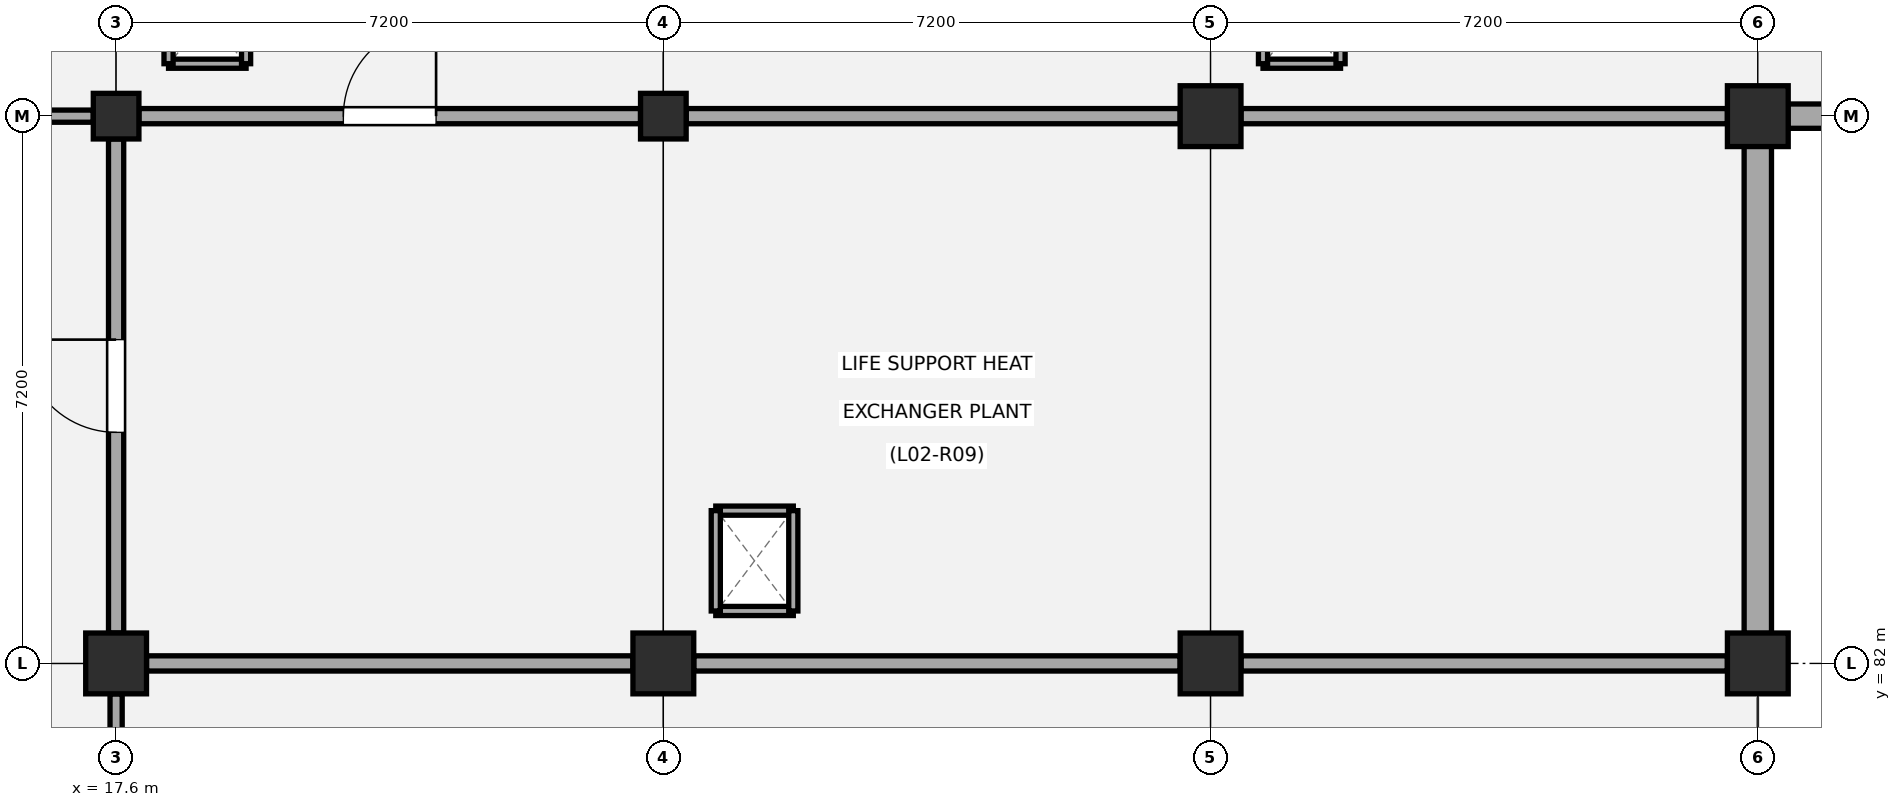
"""IFC4 building model, lengths in metres.
Left out: names, types, materials, properties, quantities, classifications, styles, units other than length and angle.
Written with IfcOpenShell. Run it as: python <this file> out.ifc"""

import sys

from ifc_helpers import new_model, si_unit, direction, frame, frame_2d, origin, origin_2d, place, context, subcontext, project, spatial, rectangle, extrude, element, fill, save


model = new_model("IFC4")
c1 = context("Model", 3, precision=1e-05, world=origin(), true_north=direction((0.0, 1.0)))
c2 = subcontext(c1, "Body", "Model", "MODEL_VIEW")
j1 = project(units=[si_unit("LENGTHUNIT", "METRE"), si_unit("PLANEANGLEUNIT", "RADIAN")], contexts=[c1])
p1 = place(None, origin())
s1 = spatial("IfcSite", under=j1, at=p1, CompositionType="ELEMENT")
p2 = place(p1, origin())
s2 = spatial("IfcBuilding", under=s1, at=p2, CompositionType="ELEMENT")
p3 = place(p2, frame((0.0, 0.0, 9.18)))
s3 = spatial("IfcBuildingStorey", under=s2, at=p3, CompositionType="ELEMENT", Elevation=9.18)
p4 = place(p3, frame((17.6, 82.0, 0.0), z_axis=(0.0, 0.0, 1.0), x_axis=(1.0, 0.0, 0.0)))
e1 = element("IfcColumn", 1, at=p4, inside=s3, PredefinedType="COLUMN", context=c2, shape_type="SweptSolid", body=[
    extrude(rectangle(XDim=0.8, YDim=0.8, at=origin_2d()), origin(), (0.0, 0.0, 1.0), 4.32),
])
p5 = place(p3, frame((17.6, 89.2, 0.0), z_axis=(0.0, 0.0, 1.0), x_axis=(1.0, 0.0, 0.0)))
e2 = element("IfcColumn", 2, at=p5, inside=s3, PredefinedType="COLUMN", context=c2, shape_type="SweptSolid", body=[
    extrude(rectangle(XDim=0.6, YDim=0.6, at=origin_2d()), origin(), (0.0, 0.0, 1.0), 4.32),
])
p6 = place(p3, frame((24.8, 82.0, 0.0), z_axis=(0.0, 0.0, 1.0), x_axis=(1.0, 0.0, 0.0)))
e3 = element("IfcColumn", 3, at=p6, inside=s3, PredefinedType="COLUMN", context=c2, shape_type="SweptSolid", body=[
    extrude(rectangle(XDim=0.8, YDim=0.8, at=origin_2d()), origin(), (0.0, 0.0, 1.0), 4.32),
])
p7 = place(p3, frame((24.8, 89.2, 0.0), z_axis=(0.0, 0.0, 1.0), x_axis=(1.0, 0.0, 0.0)))
e4 = element("IfcColumn", 4, at=p7, inside=s3, PredefinedType="COLUMN", context=c2, shape_type="SweptSolid", body=[
    extrude(rectangle(XDim=0.6, YDim=0.6, at=origin_2d()), origin(), (0.0, 0.0, 1.0), 4.32),
])
for number, where, z_axis, x_axis in (
    (5, (32.0, 82.0, 0.0), (0.0, 0.0, 1.0), (1.0, 0.0, 0.0)),
    (6, (32.0, 89.2, 0.0), (0.0, 0.0, 1.0), (1.0, 0.0, 0.0)),
    (7, (39.2, 82.0, 0.0), (0.0, 0.0, 1.0), (1.0, 0.0, 0.0)),
    (8, (39.2, 89.2, 0.0), (0.0, 0.0, 1.0), (1.0, 0.0, 0.0)),
):
    element("IfcColumn", number, at=place(p3, frame(where, z_axis=z_axis, x_axis=x_axis)), inside=s3, PredefinedType="COLUMN", context=c2, shape_type="SweptSolid", body=[
        extrude(rectangle(XDim=0.8, YDim=0.8, at=origin_2d()), origin(), (0.0, 0.0, 1.0), 4.32),
    ])
p8 = place(p3, frame((46.105, 89.2, 0.0), z_axis=(0.0, 0.0, 1.0), x_axis=(-1.0, 0.0, 0.0)))
e9 = element("IfcWall", 9, at=p8, inside=s3, PredefinedType="STANDARD", context=c2, shape_type="SweptSolid", body=[
    extrude(rectangle(XDim=6.51, YDim=0.32, at=frame_2d((3.255, 0.0))), origin(), (0.0, 0.0, 1.0), 3.41),
])
p9 = place(p8, frame((2.255, 0.0, 0.95)))
e10 = element("IfcOpeningElement", 10, at=p9, cuts=e9, PredefinedType="OPENING", context=c2, shape_type="SweptSolid", body=[
    extrude(rectangle(XDim=2.0, YDim=1.9, at=frame_2d((1.0, 0.95))), frame((0.0, 0.17, 0.0), z_axis=(0.0, -1.0, 0.0), x_axis=(1.0, 0.0, 0.0)), (0.0, 0.0, 1.0), 0.34),
])
p10 = place(p3, frame((39.2, 88.805, 0.0), z_axis=(0.0, 0.0, 1.0), x_axis=(0.0, -1.0, 0.0)))
e11 = element("IfcWall", 11, at=p10, inside=s3, PredefinedType="STANDARD", context=c2, shape_type="SweptSolid", body=[
    extrude(rectangle(XDim=6.41, YDim=0.36, at=frame_2d((3.205, 0.0))), origin(), (0.0, 0.0, 1.0), 3.41),
])
p11 = place(p3, frame((18.29, 89.89, 0.0), z_axis=(0.0, 0.0, 1.0), x_axis=(1.0, 0.0, 0.0)))
e12 = element("IfcWall", 12, at=p11, inside=s3, PredefinedType="PARTITIONING", context=c2, shape_type="SweptSolid", body=[
    extrude(rectangle(XDim=1.02, YDim=0.12, at=frame_2d((0.51, 0.0))), origin(), (0.0, 0.0, 1.0), 4.02),
])
for number, where, z_axis, x_axis in (
    (13, (18.29, 89.89, 0.0), (0.0, 0.0, 1.0), (0.0, 1.0, 0.0)),
    (14, (19.31, 89.89, 0.0), (0.0, 0.0, 1.0), (0.0, 1.0, 0.0)),
):
    element("IfcWall", number, at=place(p3, frame(where, z_axis=z_axis, x_axis=x_axis)), inside=s3, PredefinedType="PARTITIONING", context=c2, shape_type="SweptSolid", body=[
        extrude(rectangle(XDim=1.32, YDim=0.12, at=frame_2d((0.66, 0.0))), origin(), (0.0, 0.0, 1.0), 4.02),
    ])
for number, where, z_axis, x_axis in (
    (15, (25.49, 82.69, 0.0), (0.0, 0.0, 1.0), (1.0, 0.0, 0.0)),
    (16, (25.49, 84.01, 0.0), (0.0, 0.0, 1.0), (1.0, 0.0, 0.0)),
):
    element("IfcWall", number, at=place(p3, frame(where, z_axis=z_axis, x_axis=x_axis)), inside=s3, PredefinedType="PARTITIONING", context=c2, shape_type="SweptSolid", body=[
        extrude(rectangle(XDim=1.02, YDim=0.12, at=frame_2d((0.51, 0.0))), origin(), (0.0, 0.0, 1.0), 4.02),
    ])
for number, where, z_axis, x_axis in (
    (17, (25.49, 82.69, 0.0), (0.0, 0.0, 1.0), (0.0, 1.0, 0.0)),
    (18, (26.51, 82.69, 0.0), (0.0, 0.0, 1.0), (0.0, 1.0, 0.0)),
):
    element("IfcWall", number, at=place(p3, frame(where, z_axis=z_axis, x_axis=x_axis)), inside=s3, PredefinedType="PARTITIONING", context=c2, shape_type="SweptSolid", body=[
        extrude(rectangle(XDim=1.32, YDim=0.12, at=frame_2d((0.66, 0.0))), origin(), (0.0, 0.0, 1.0), 4.02),
    ])
p12 = place(p3, frame((32.69, 89.89, 0.0), z_axis=(0.0, 0.0, 1.0), x_axis=(1.0, 0.0, 0.0)))
e19 = element("IfcWall", 19, at=p12, inside=s3, PredefinedType="PARTITIONING", context=c2, shape_type="SweptSolid", body=[
    extrude(rectangle(XDim=1.02, YDim=0.12, at=frame_2d((0.51, 0.0))), origin(), (0.0, 0.0, 1.0), 4.02),
])
for number, where, z_axis, x_axis in (
    (20, (32.69, 89.89, 0.0), (0.0, 0.0, 1.0), (0.0, 1.0, 0.0)),
    (21, (33.71, 89.89, 0.0), (0.0, 0.0, 1.0), (0.0, 1.0, 0.0)),
):
    element("IfcWall", number, at=place(p3, frame(where, z_axis=z_axis, x_axis=x_axis)), inside=s3, PredefinedType="PARTITIONING", context=c2, shape_type="SweptSolid", body=[
        extrude(rectangle(XDim=1.32, YDim=0.12, at=frame_2d((0.66, 0.0))), origin(), (0.0, 0.0, 1.0), 4.02),
    ])
p13 = place(p3, frame((17.6, 75.2, 0.0), z_axis=(0.0, 0.0, 1.0), x_axis=(0.0, 1.0, 0.0)))
e22 = element("IfcWall", 22, at=p13, inside=s3, PredefinedType="PARTITIONING", context=c2, shape_type="SweptSolid", body=[
    extrude(rectangle(XDim=6.4, YDim=0.16, at=frame_2d((3.2, 0.0))), origin(), (0.0, 0.0, 1.0), 3.36),
])
p14 = place(p3, frame((17.6, 82.4, 0.0), z_axis=(0.0, 0.0, 1.0), x_axis=(0.0, 1.0, 0.0)))
e23 = element("IfcWall", 23, at=p14, inside=s3, PredefinedType="PARTITIONING", context=c2, shape_type="SweptSolid", body=[
    extrude(rectangle(XDim=6.5, YDim=0.2, at=frame_2d((3.25, 0.0))), origin(), (0.0, 0.0, 1.0), 3.43),
])
p15 = place(p14, frame((2.64, 0.0, 0.0)))
e24 = element("IfcOpeningElement", 24, at=p15, cuts=e23, PredefinedType="OPENING", context=c2, shape_type="SweptSolid", body=[
    extrude(rectangle(XDim=1.22, YDim=2.16, at=frame_2d((0.61, 1.08))), frame((0.0, 0.11, 0.0), z_axis=(0.0, -1.0, 0.0), x_axis=(1.0, 0.0, 0.0)), (0.0, 0.0, 1.0), 0.22),
])
p16 = place(p3, frame((10.7, 89.2, 0.0), z_axis=(0.0, 0.0, 1.0), x_axis=(1.0, 0.0, 0.0)))
e25 = element("IfcWall", 25, at=p16, inside=s3, PredefinedType="PARTITIONING", context=c2, shape_type="SweptSolid", body=[
    extrude(rectangle(XDim=6.6, YDim=0.16, at=frame_2d((3.3, 0.0))), origin(), (0.0, 0.0, 1.0), 3.43),
])
p17 = place(p16, frame((2.37, 0.0, 0.0)))
e26 = element("IfcOpeningElement", 26, at=p17, cuts=e25, PredefinedType="OPENING", context=c2, shape_type="SweptSolid", body=[
    extrude(rectangle(XDim=1.86, YDim=2.26, at=frame_2d((0.93, 1.13))), frame((0.0, 0.09, 0.0), z_axis=(0.0, -1.0, 0.0), x_axis=(1.0, 0.0, 0.0)), (0.0, 0.0, 1.0), 0.18),
])
p18 = place(p3, frame((18.0, 82.0, 0.0), z_axis=(0.0, 0.0, 1.0), x_axis=(1.0, 0.0, 0.0)))
e27 = element("IfcWall", 27, at=p18, inside=s3, PredefinedType="PARTITIONING", context=c2, shape_type="SweptSolid", body=[
    extrude(rectangle(XDim=6.4, YDim=0.2, at=frame_2d((3.2, 0.0))), origin(), (0.0, 0.0, 1.0), 3.41),
])
p19 = place(p3, frame((17.9, 89.2, 0.0), z_axis=(0.0, 0.0, 1.0), x_axis=(1.0, 0.0, 0.0)))
e28 = element("IfcWall", 28, at=p19, inside=s3, PredefinedType="PARTITIONING", context=c2, shape_type="SweptSolid", body=[
    extrude(rectangle(XDim=6.6, YDim=0.2, at=frame_2d((3.3, 0.0))), origin(), (0.0, 0.0, 1.0), 3.38),
])
p20 = place(p19, frame((2.69, 0.0, 0.0)))
e29 = element("IfcOpeningElement", 29, at=p20, cuts=e28, PredefinedType="OPENING", context=c2, shape_type="SweptSolid", body=[
    extrude(rectangle(XDim=1.22, YDim=2.16, at=frame_2d((0.61, 1.08))), frame((0.0, 0.11, 0.0), z_axis=(0.0, -1.0, 0.0), x_axis=(1.0, 0.0, 0.0)), (0.0, 0.0, 1.0), 0.22),
])
p21 = place(p3, frame((25.2, 82.0, 0.0), z_axis=(0.0, 0.0, 1.0), x_axis=(1.0, 0.0, 0.0)))
e30 = element("IfcWall", 30, at=p21, inside=s3, PredefinedType="PARTITIONING", context=c2, shape_type="SweptSolid", body=[
    extrude(rectangle(XDim=6.4, YDim=0.2, at=frame_2d((3.2, 0.0))), origin(), (0.0, 0.0, 1.0), 3.38),
])
p22 = place(p3, frame((25.1, 89.2, 0.0), z_axis=(0.0, 0.0, 1.0), x_axis=(1.0, 0.0, 0.0)))
e31 = element("IfcWall", 31, at=p22, inside=s3, PredefinedType="PARTITIONING", context=c2, shape_type="SweptSolid", body=[
    extrude(rectangle(XDim=6.5, YDim=0.2, at=frame_2d((3.25, 0.0))), origin(), (0.0, 0.0, 1.0), 3.43),
])
p23 = place(p3, frame((32.4, 82.0, 0.0), z_axis=(0.0, 0.0, 1.0), x_axis=(1.0, 0.0, 0.0)))
e32 = element("IfcWall", 32, at=p23, inside=s3, PredefinedType="PARTITIONING", context=c2, shape_type="SweptSolid", body=[
    extrude(rectangle(XDim=6.4, YDim=0.2, at=frame_2d((3.2, 0.0))), origin(), (0.0, 0.0, 1.0), 3.41),
])
p24 = place(p3, frame((32.4, 89.2, 0.0), z_axis=(0.0, 0.0, 1.0), x_axis=(1.0, 0.0, 0.0)))
e33 = element("IfcWall", 33, at=p24, inside=s3, PredefinedType="PARTITIONING", context=c2, shape_type="SweptSolid", body=[
    extrude(rectangle(XDim=6.4, YDim=0.2, at=frame_2d((3.2, 0.0))), origin(), (0.0, 0.0, 1.0), 3.38),
])
p25 = place(p20, origin())
e34 = element("IfcDoor", 34, at=p25, inside=s3, OperationType="SINGLE_SWING_RIGHT", PredefinedType="DOOR", context=c2, shape_type="SweptSolid", body=[
    extrude(rectangle(XDim=1.22, YDim=2.16, at=frame_2d((0.61, 1.08))), frame((0.0, 0.025, 0.0), z_axis=(0.0, -1.0, 0.0), x_axis=(1.0, 0.0, 0.0)), (0.0, 0.0, 1.0), 0.05),
])
fill(e29, e34)
p26 = place(p15, origin())
e35 = element("IfcDoor", 35, at=p26, inside=s3, OperationType="SINGLE_SWING_RIGHT", PredefinedType="DOOR", context=c2, shape_type="SweptSolid", body=[
    extrude(rectangle(XDim=1.22, YDim=2.16, at=frame_2d((0.61, 1.08))), frame((0.0, 0.025, 0.0), z_axis=(0.0, -1.0, 0.0), x_axis=(1.0, 0.0, 0.0)), (0.0, 0.0, 1.0), 0.05),
])
fill(e24, e35)
save(model, sys.argv[1])
